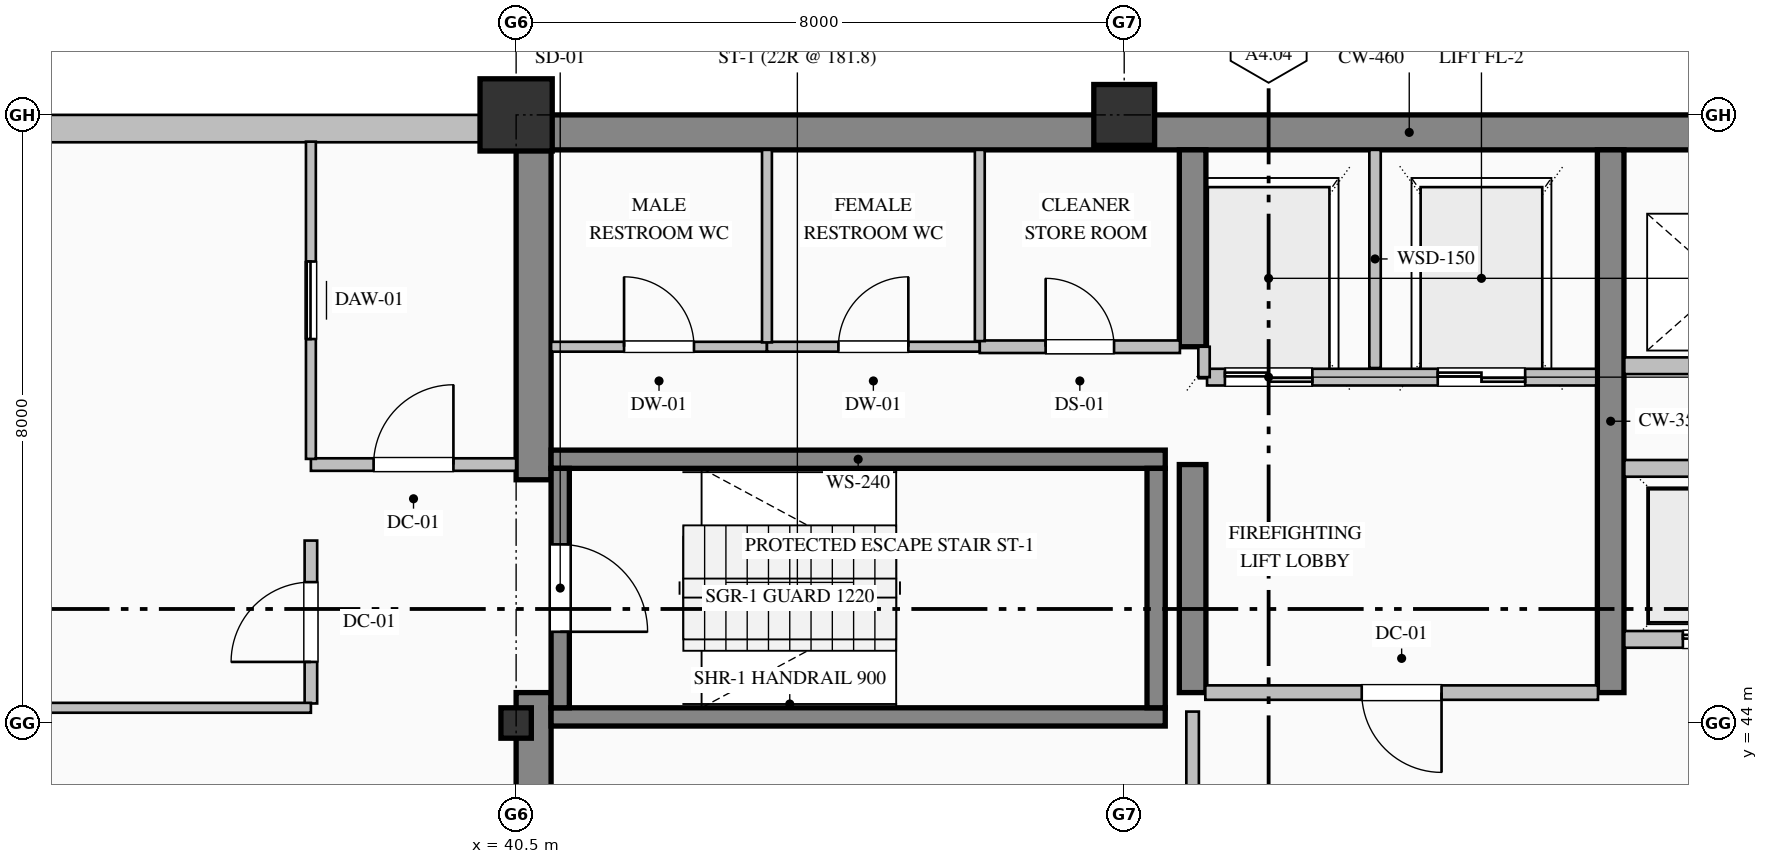
"""IFC4 building model, lengths in metres.
Left out: names, types, materials, properties, quantities, classifications, styles, units other than length and angle.
Written with IfcOpenShell. Run it as: python <this file> out.ifc"""

import sys

from ifc_helpers import new_model, si_unit, direction, frame, frame_2d, origin, origin_2d, place, context, subcontext, project, spatial, rectangle, hollow_rectangle, i_section, extrude, element, fill, save


model = new_model("IFC4")
c1 = context("Model", 3, precision=1e-05, world=origin(), true_north=direction((0.0, 1.0)))
c2 = subcontext(c1, "Body", "Model", "MODEL_VIEW")
j1 = project(units=[si_unit("LENGTHUNIT", "METRE"), si_unit("PLANEANGLEUNIT", "RADIAN")], contexts=[c1])
p1 = place(None, origin())
s1 = spatial("IfcSite", under=j1, at=p1, CompositionType="ELEMENT")
p2 = place(p1, origin())
s2 = spatial("IfcBuilding", under=s1, at=p2, CompositionType="ELEMENT")
p3 = place(p2, frame((0.0, 0.0, 253.8)))
s3 = spatial("IfcBuildingStorey", under=s2, at=p3, CompositionType="ELEMENT", Elevation=253.8)
p4 = place(p3, frame((40.5, 51.77, 0.0), z_axis=(0.0, 0.0, 1.0), x_axis=(1.0, 0.0, 0.0)))
e1 = element("IfcWall", 1, at=p4, inside=s3, PredefinedType="SHEAR", context=c2, shape_type="SweptSolid", body=[
    extrude(rectangle(XDim=23.5, YDim=0.46, at=frame_2d((11.75, 0.0))), origin(), (0.0, 0.0, 1.0), 3.775),
])
p5 = place(p3, frame((40.73, 36.46, 0.0), z_axis=(0.0, 0.0, 1.0), x_axis=(0.0, 1.0, 0.0)))
e2 = element("IfcWall", 2, at=p5, inside=s3, PredefinedType="SHEAR", context=c2, shape_type="SweptSolid", body=[
    extrude(rectangle(XDim=7.94, YDim=0.46, at=frame_2d((3.97, 0.0))), origin(), (0.0, 0.0, 1.0), 3.775),
])
p6 = place(p3, frame((40.73, 47.2, 0.0), z_axis=(0.0, 0.0, 1.0), x_axis=(0.0, 1.0, 0.0)))
e3 = element("IfcWall", 3, at=p6, inside=s3, PredefinedType="SHEAR", context=c2, shape_type="SweptSolid", body=[
    extrude(rectangle(XDim=4.34, YDim=0.46, at=frame_2d((2.17, 0.0))), origin(), (0.0, 0.0, 1.0), 3.775),
])
p7 = place(p3, frame((49.4, 44.4, 0.0), z_axis=(0.0, 0.0, 1.0), x_axis=(0.0, 1.0, 0.0)))
e4 = element("IfcWall", 4, at=p7, inside=s3, PredefinedType="SHEAR", context=c2, shape_type="SweptSolid", body=[
    extrude(rectangle(XDim=3.0, YDim=0.35, at=frame_2d((1.5, 0.0))), origin(), (0.0, 0.0, 1.0), 3.775),
])
p8 = place(p3, frame((49.4, 48.95, 0.0), z_axis=(0.0, 0.0, 1.0), x_axis=(0.0, 1.0, 0.0)))
e5 = element("IfcWall", 5, at=p8, inside=s3, PredefinedType="SHEAR", context=c2, shape_type="SweptSolid", body=[
    extrude(rectangle(XDim=2.59, YDim=0.35, at=frame_2d((1.295, 0.0))), origin(), (0.0, 0.0, 1.0), 3.775),
])
p9 = place(p3, frame((54.9, 44.4, 0.0), z_axis=(0.0, 0.0, 1.0), x_axis=(0.0, 1.0, 0.0)))
e6 = element("IfcWall", 6, at=p9, inside=s3, PredefinedType="SHEAR", context=c2, shape_type="SweptSolid", body=[
    extrude(rectangle(XDim=7.14, YDim=0.35, at=frame_2d((3.57, 0.0))), origin(), (0.0, 0.0, 1.0), 3.775),
])
p10 = place(p3, frame((40.5, 44.0, 0.0), z_axis=(0.0, 0.0, 1.0), x_axis=(1.0, 0.0, 0.0)))
e7 = element("IfcColumn", 7, at=p10, inside=s3, PredefinedType="COLUMN", context=c2, shape_type="SweptSolid", body=[
    extrude(i_section(OverallWidth=0.4, OverallDepth=0.4, WebThickness=0.013, FlangeThickness=0.021, FilletRadius=0.022, at=origin_2d()), origin(), (0.0, 0.0, 1.0), 4.0),
])
p11 = place(p3, frame((40.5, 52.0, 0.0), z_axis=(0.0, 0.0, 1.0), x_axis=(1.0, 0.0, 0.0)))
e8 = element("IfcColumn", 8, at=p11, inside=s3, PredefinedType="COLUMN", context=c2, shape_type="SweptSolid", body=[
    extrude(hollow_rectangle(XDim=0.95, YDim=0.95, WallThickness=0.036, at=origin_2d()), origin(), (0.0, 0.0, 1.0), 4.0),
])
p12 = place(p3, frame((48.5, 52.0, 0.0), z_axis=(0.0, 0.0, 1.0), x_axis=(1.0, 0.0, 0.0)))
e9 = element("IfcColumn", 9, at=p12, inside=s3, PredefinedType="COLUMN", context=c2, shape_type="SweptSolid", body=[
    extrude(hollow_rectangle(XDim=0.8, YDim=0.8, WallThickness=0.032, at=origin_2d()), origin(), (0.0, 0.0, 1.0), 4.0),
])
p13 = place(p3, frame((13.0, 51.82, 0.0), z_axis=(0.0, 0.0, 1.0), x_axis=(1.0, 0.0, 0.0)))
e10 = element("IfcWall", 10, at=p13, inside=s3, PredefinedType="SOLIDWALL", context=c2, shape_type="SweptSolid", body=[
    extrude(rectangle(XDim=27.52, YDim=0.36, at=frame_2d((13.76, 0.0))), origin(), (0.0, 0.0, 1.0), 3.325),
])
p14 = place(p13, frame((6.525, 0.0, 0.9)))
e11 = element("IfcOpeningElement", 11, at=p14, cuts=e10, PredefinedType="OPENING", context=c2, shape_type="SweptSolid", body=[
    extrude(rectangle(XDim=1.35, YDim=1.85, at=frame_2d((0.675, 0.925))), frame((0.0, 0.19, 0.0), z_axis=(0.0, -1.0, 0.0), x_axis=(1.0, 0.0, 0.0)), (0.0, 0.0, 1.0), 0.38),
])
p15 = place(p13, frame((17.325, 0.0, 0.9)))
e12 = element("IfcOpeningElement", 12, at=p15, cuts=e10, PredefinedType="OPENING", context=c2, shape_type="SweptSolid", body=[
    extrude(rectangle(XDim=1.35, YDim=1.85, at=frame_2d((0.675, 0.925))), frame((0.0, 0.19, 0.0), z_axis=(0.0, -1.0, 0.0), x_axis=(1.0, 0.0, 0.0)), (0.0, 0.0, 1.0), 0.38),
])
for number, where, z_axis, x_axis in (
    (13, (40.96, 47.47, 0.0), (0.0, 0.0, 1.0), (1.0, 0.0, 0.0)),
    (14, (49.04, 44.08, 0.0), (0.0, 0.0, 1.0), (-1.0, 0.0, 0.0)),
):
    element("IfcWall", number, at=place(p3, frame(where, z_axis=z_axis, x_axis=x_axis)), inside=s3, PredefinedType="SOLIDWALL", context=c2, shape_type="SweptSolid", body=[
        extrude(rectangle(XDim=8.08, YDim=0.24, at=frame_2d((4.04, 0.0))), origin(), (0.0, 0.0, 1.0), 4.0),
    ])
p16 = place(p3, frame((41.08, 47.35, 0.0), z_axis=(0.0, 0.0, 1.0), x_axis=(0.0, -1.0, 0.0)))
e15 = element("IfcWall", 15, at=p16, inside=s3, PredefinedType="SOLIDWALL", context=c2, shape_type="SweptSolid", body=[
    extrude(rectangle(XDim=3.15, YDim=0.24, at=frame_2d((1.575, 0.0))), origin(), (0.0, 0.0, 1.0), 4.0),
])
p17 = place(p16, frame((1.0, 0.0, 0.0)))
e16 = element("IfcOpeningElement", 16, at=p17, cuts=e15, PredefinedType="OPENING", context=c2, shape_type="SweptSolid", body=[
    extrude(rectangle(XDim=1.15, YDim=2.2, at=frame_2d((0.575, 1.1))), frame((0.0, 0.13, 0.0), z_axis=(0.0, -1.0, 0.0), x_axis=(1.0, 0.0, 0.0)), (0.0, 0.0, 1.0), 0.26),
])
p18 = place(p3, frame((48.92, 44.2, 0.0), z_axis=(0.0, 0.0, 1.0), x_axis=(0.0, 1.0, 0.0)))
e17 = element("IfcWall", 17, at=p18, inside=s3, PredefinedType="SOLIDWALL", context=c2, shape_type="SweptSolid", body=[
    extrude(rectangle(XDim=3.15, YDim=0.24, at=frame_2d((1.575, 0.0))), origin(), (0.0, 0.0, 1.0), 4.0),
])
p19 = place(p3, frame((54.71, 48.55, 0.0), z_axis=(0.0, 0.0, 1.0), x_axis=(-1.0, 0.0, 0.0)))
e18 = element("IfcWall", 18, at=p19, inside=s3, PredefinedType="PARTITIONING", context=c2, shape_type="SweptSolid", body=[
    extrude(rectangle(XDim=5.12, YDim=0.22, at=frame_2d((2.56, 0.0))), origin(), (0.0, 0.0, 1.0), 3.775),
])
p20 = place(p19, frame((3.735, 0.0, 0.0)))
e19 = element("IfcOpeningElement", 19, at=p20, cuts=e18, PredefinedType="OPENING", context=c2, shape_type="SweptSolid", body=[
    extrude(rectangle(XDim=1.15, YDim=2.2, at=frame_2d((0.575, 1.1))), frame((0.0, 0.12, 0.0), z_axis=(0.0, -1.0, 0.0), x_axis=(1.0, 0.0, 0.0)), (0.0, 0.0, 1.0), 0.24),
])
p21 = place(p19, frame((0.935, 0.0, 0.0)))
e20 = element("IfcOpeningElement", 20, at=p21, cuts=e18, PredefinedType="OPENING", context=c2, shape_type="SweptSolid", body=[
    extrude(rectangle(XDim=1.15, YDim=2.2, at=frame_2d((0.575, 1.1))), frame((0.0, 0.12, 0.0), z_axis=(0.0, -1.0, 0.0), x_axis=(1.0, 0.0, 0.0)), (0.0, 0.0, 1.0), 0.24),
])
p22 = place(p3, frame((51.8, 48.67, 0.0), z_axis=(0.0, 0.0, 1.0), x_axis=(0.0, 1.0, 0.0)))
e21 = element("IfcWall", 21, at=p22, inside=s3, PredefinedType="PARTITIONING", context=c2, shape_type="SweptSolid", body=[
    extrude(rectangle(XDim=2.87, YDim=0.15, at=frame_2d((1.435, 0.0))), origin(), (0.0, 0.0, 1.0), 3.775),
])
p23 = place(p3, frame((49.55, 48.55, 0.0), z_axis=(0.0, 0.0, 1.0), x_axis=(0.0, 1.0, 0.0)))
e22 = element("IfcWall", 22, at=p23, inside=s3, PredefinedType="PARTITIONING", context=c2, shape_type="SweptSolid", body=[
    extrude(rectangle(XDim=0.4, YDim=0.15, at=frame_2d((0.2, 0.0))), origin(), (0.0, 0.0, 1.0), 3.775),
])
p24 = place(p3, frame((63.32, 45.1, 0.0), z_axis=(0.0, 0.0, 1.0), x_axis=(-1.0, 0.0, 0.0)))
e23 = element("IfcWall", 23, at=p24, inside=s3, PredefinedType="PARTITIONING", context=c2, shape_type="SweptSolid", body=[
    extrude(rectangle(XDim=8.24, YDim=0.22, at=frame_2d((4.12, 0.0))), origin(), (0.0, 0.0, 1.0), 3.775),
])
p25 = place(p24, frame((6.37, 0.0, 0.0)))
e24 = element("IfcOpeningElement", 24, at=p25, cuts=e23, PredefinedType="OPENING", context=c2, shape_type="SweptSolid", body=[
    extrude(rectangle(XDim=1.1, YDim=2.2, at=frame_2d((0.55, 1.1))), frame((0.0, 0.12, 0.0), z_axis=(0.0, -1.0, 0.0), x_axis=(1.0, 0.0, 0.0)), (0.0, 0.0, 1.0), 0.24),
])
p26 = place(p24, frame((3.57, 0.0, 0.0)))
e25 = element("IfcOpeningElement", 25, at=p26, cuts=e23, PredefinedType="OPENING", context=c2, shape_type="SweptSolid", body=[
    extrude(rectangle(XDim=1.1, YDim=2.2, at=frame_2d((0.55, 1.1))), frame((0.0, 0.12, 0.0), z_axis=(0.0, -1.0, 0.0), x_axis=(1.0, 0.0, 0.0)), (0.0, 0.0, 1.0), 0.24),
])
p27 = place(p24, frame((0.77, 0.0, 0.0)))
e26 = element("IfcOpeningElement", 26, at=p27, cuts=e23, PredefinedType="OPENING", context=c2, shape_type="SweptSolid", body=[
    extrude(rectangle(XDim=1.1, YDim=2.2, at=frame_2d((0.55, 1.1))), frame((0.0, 0.12, 0.0), z_axis=(0.0, -1.0, 0.0), x_axis=(1.0, 0.0, 0.0)), (0.0, 0.0, 1.0), 0.24),
])
for number, where, z_axis, x_axis in (
    (27, (55.08, 47.35, 0.0), (0.0, 0.0, 1.0), (1.0, 0.0, 0.0)),
    (28, (63.32, 48.7, 0.0), (0.0, 0.0, 1.0), (-1.0, 0.0, 0.0)),
):
    element("IfcWall", number, at=place(p3, frame(where, z_axis=z_axis, x_axis=x_axis)), inside=s3, PredefinedType="PARTITIONING", context=c2, shape_type="SweptSolid", body=[
        extrude(rectangle(XDim=8.24, YDim=0.22, at=frame_2d((4.12, 0.0))), origin(), (0.0, 0.0, 1.0), 3.775),
    ])
p28 = place(p3, frame((37.8, 47.4, 0.0), z_axis=(0.0, 0.0, 1.0), x_axis=(1.0, 0.0, 0.0)))
e29 = element("IfcWall", 29, at=p28, inside=s3, PredefinedType="PARTITIONING", context=c2, shape_type="SweptSolid", body=[
    extrude(rectangle(XDim=2.7, YDim=0.165, at=frame_2d((1.35, 0.0))), origin(), (0.0, 0.0, 1.0), 3.775),
])
p29 = place(p28, frame((0.825, 0.0, 0.0)))
e30 = element("IfcOpeningElement", 30, at=p29, cuts=e29, PredefinedType="OPENING", context=c2, shape_type="SweptSolid", body=[
    extrude(rectangle(XDim=1.05, YDim=2.15, at=frame_2d((0.525, 1.075))), frame((0.0, 0.093, 0.0), z_axis=(0.0, -1.0, 0.0), x_axis=(1.0, 0.0, 0.0)), (0.0, 0.0, 1.0), 0.185),
])
p30 = place(p3, frame((37.8, 44.257, 0.0), z_axis=(0.0, 0.0, 1.0), x_axis=(0.0, 1.0, 0.0)))
e31 = element("IfcWall", 31, at=p30, inside=s3, PredefinedType="PARTITIONING", context=c2, shape_type="SweptSolid", body=[
    extrude(rectangle(XDim=2.143, YDim=0.165, at=frame_2d((1.071, 0.0))), origin(), (0.0, 0.0, 1.0), 3.775),
])
p31 = place(p30, frame((0.546, 0.0, 0.0)))
e32 = element("IfcOpeningElement", 32, at=p31, cuts=e31, PredefinedType="OPENING", context=c2, shape_type="SweptSolid", body=[
    extrude(rectangle(XDim=1.05, YDim=2.15, at=frame_2d((0.525, 1.075))), frame((0.0, 0.093, 0.0), z_axis=(0.0, -1.0, 0.0), x_axis=(1.0, 0.0, 0.0)), (0.0, 0.0, 1.0), 0.185),
])
p32 = place(p3, frame((37.8, 47.475, 0.0), z_axis=(0.0, 0.0, 1.0), x_axis=(0.0, 1.0, 0.0)))
e33 = element("IfcWall", 33, at=p32, inside=s3, PredefinedType="PARTITIONING", context=c2, shape_type="SweptSolid", body=[
    extrude(rectangle(XDim=4.173, YDim=0.13, at=frame_2d((2.087, 0.0))), origin(), (0.0, 0.0, 1.0), 3.775),
])
p33 = place(p32, frame((1.577, 0.0, 0.0)))
e34 = element("IfcOpeningElement", 34, at=p33, cuts=e33, PredefinedType="OPENING", context=c2, shape_type="SweptSolid", body=[
    extrude(rectangle(XDim=1.02, YDim=2.15, at=frame_2d((0.51, 1.075))), frame((0.0, 0.075, 0.0), z_axis=(0.0, -1.0, 0.0), x_axis=(1.0, 0.0, 0.0)), (0.0, 0.0, 1.0), 0.15),
])
p34 = place(p3, frame((40.96, 48.95, 0.0), z_axis=(0.0, 0.0, 1.0), x_axis=(1.0, 0.0, 0.0)))
e35 = element("IfcWall", 35, at=p34, inside=s3, PredefinedType="PARTITIONING", context=c2, shape_type="SweptSolid", body=[
    extrude(rectangle(XDim=2.84, YDim=0.13, at=frame_2d((1.42, 0.0))), origin(), (0.0, 0.0, 1.0), 3.775),
])
p35 = place(p34, frame((0.96, 0.0, 0.0)))
e36 = element("IfcOpeningElement", 36, at=p35, cuts=e35, PredefinedType="OPENING", context=c2, shape_type="SweptSolid", body=[
    extrude(rectangle(XDim=0.92, YDim=2.15, at=frame_2d((0.46, 1.075))), frame((0.0, 0.075, 0.0), z_axis=(0.0, -1.0, 0.0), x_axis=(1.0, 0.0, 0.0)), (0.0, 0.0, 1.0), 0.15),
])
p36 = place(p3, frame((43.8, 48.95, 0.0), z_axis=(0.0, 0.0, 1.0), x_axis=(1.0, 0.0, 0.0)))
e37 = element("IfcWall", 37, at=p36, inside=s3, PredefinedType="PARTITIONING", context=c2, shape_type="SweptSolid", body=[
    extrude(rectangle(XDim=2.8, YDim=0.13, at=frame_2d((1.4, 0.0))), origin(), (0.0, 0.0, 1.0), 3.775),
])
p37 = place(p36, frame((0.94, 0.0, 0.0)))
e38 = element("IfcOpeningElement", 38, at=p37, cuts=e37, PredefinedType="OPENING", context=c2, shape_type="SweptSolid", body=[
    extrude(rectangle(XDim=0.92, YDim=2.15, at=frame_2d((0.46, 1.075))), frame((0.0, 0.075, 0.0), z_axis=(0.0, -1.0, 0.0), x_axis=(1.0, 0.0, 0.0)), (0.0, 0.0, 1.0), 0.15),
])
p38 = place(p3, frame((46.6, 48.95, 0.0), z_axis=(0.0, 0.0, 1.0), x_axis=(1.0, 0.0, 0.0)))
e39 = element("IfcWall", 39, at=p38, inside=s3, PredefinedType="PARTITIONING", context=c2, shape_type="SweptSolid", body=[
    extrude(rectangle(XDim=2.633, YDim=0.165, at=frame_2d((1.316, 0.0))), origin(), (0.0, 0.0, 1.0), 3.775),
])
p39 = place(p38, frame((0.866, 0.0, 0.0)))
e40 = element("IfcOpeningElement", 40, at=p39, cuts=e39, PredefinedType="OPENING", context=c2, shape_type="SweptSolid", body=[
    extrude(rectangle(XDim=0.9, YDim=2.15, at=frame_2d((0.45, 1.075))), frame((0.0, 0.093, 0.0), z_axis=(0.0, -1.0, 0.0), x_axis=(1.0, 0.0, 0.0)), (0.0, 0.0, 1.0), 0.185),
])
p40 = place(p3, frame((54.733, 44.4, 0.0), z_axis=(0.0, 0.0, 1.0), x_axis=(-1.0, 0.0, 0.0)))
e41 = element("IfcWall", 41, at=p40, inside=s3, PredefinedType="PARTITIONING", context=c2, shape_type="SweptSolid", body=[
    extrude(rectangle(XDim=5.166, YDim=0.19, at=frame_2d((2.583, 0.0))), origin(), (0.0, 0.0, 1.0), 3.775),
])
p41 = place(p40, frame((2.058, 0.0, 0.0)))
e42 = element("IfcOpeningElement", 42, at=p41, cuts=e41, PredefinedType="OPENING", context=c2, shape_type="SweptSolid", body=[
    extrude(rectangle(XDim=1.05, YDim=2.15, at=frame_2d((0.525, 1.075))), frame((0.0, 0.105, 0.0), z_axis=(0.0, -1.0, 0.0), x_axis=(1.0, 0.0, 0.0)), (0.0, 0.0, 1.0), 0.21),
])
p42 = place(p3, frame((49.4, 36.46, 0.0), z_axis=(0.0, 0.0, 1.0), x_axis=(0.0, 1.0, 0.0)))
e43 = element("IfcWall", 43, at=p42, inside=s3, PredefinedType="PARTITIONING", context=c2, shape_type="SweptSolid", body=[
    extrude(rectangle(XDim=7.69, YDim=0.165, at=frame_2d((3.845, 0.0))), origin(), (0.0, 0.0, 1.0), 3.017),
])
p43 = place(p42, frame((3.345, 0.0, 0.0)))
e44 = element("IfcOpeningElement", 44, at=p43, cuts=e43, PredefinedType="OPENING", context=c2, shape_type="SweptSolid", body=[
    extrude(rectangle(XDim=1.0, YDim=2.15, at=frame_2d((0.5, 1.075))), frame((0.0, 0.093, 0.0), z_axis=(0.0, -1.0, 0.0), x_axis=(1.0, 0.0, 0.0)), (0.0, 0.0, 1.0), 0.185),
])
p44 = place(p3, frame((43.8, 51.54, 0.0), z_axis=(0.0, 0.0, 1.0), x_axis=(0.0, -1.0, 0.0)))
e45 = element("IfcWall", 45, at=p44, inside=s3, PredefinedType="PARTITIONING", context=c2, shape_type="SweptSolid", body=[
    extrude(rectangle(XDim=2.533, YDim=0.13, at=frame_2d((1.267, 0.0))), origin(), (0.0, 0.0, 1.0), 3.775),
])
p45 = place(p3, frame((46.6, 51.54, 0.0), z_axis=(0.0, 0.0, 1.0), x_axis=(0.0, -1.0, 0.0)))
e46 = element("IfcWall", 46, at=p45, inside=s3, PredefinedType="PARTITIONING", context=c2, shape_type="SweptSolid", body=[
    extrude(rectangle(XDim=2.516, YDim=0.13, at=frame_2d((1.258, 0.0))), origin(), (0.0, 0.0, 1.0), 3.775),
])
p46 = place(p3, frame((37.8, 44.2, 0.0), z_axis=(0.0, 0.0, 1.0), x_axis=(-1.0, 0.0, 0.0)))
e47 = element("IfcWall", 47, at=p46, inside=s3, PredefinedType="PARTITIONING", context=c2, shape_type="SweptSolid", body=[
    extrude(rectangle(XDim=8.2, YDim=0.13, at=frame_2d((4.1, 0.0))), origin(), (0.0, 0.0, 1.0), 3.775),
])
p47 = place(p46, frame((3.6, 0.0, 0.0)))
e48 = element("IfcOpeningElement", 48, at=p47, cuts=e47, PredefinedType="OPENING", context=c2, shape_type="SweptSolid", body=[
    extrude(rectangle(XDim=1.0, YDim=2.15, at=frame_2d((0.5, 1.075))), frame((0.0, 0.075, 0.0), z_axis=(0.0, -1.0, 0.0), x_axis=(1.0, 0.0, 0.0)), (0.0, 0.0, 1.0), 0.15),
])
p48 = place(p17, origin())
e49 = element("IfcDoor", 49, at=p48, inside=s3, OperationType="SINGLE_SWING_RIGHT", PredefinedType="DOOR", context=c2, shape_type="SweptSolid", body=[
    extrude(rectangle(XDim=1.15, YDim=2.2, at=frame_2d((0.575, 1.1))), frame((0.0, 0.025, 0.0), z_axis=(0.0, -1.0, 0.0), x_axis=(1.0, 0.0, 0.0)), (0.0, 0.0, 1.0), 0.05),
])
fill(e16, e49)
p49 = place(p20, origin())
e50 = element("IfcDoor", 50, at=p49, inside=s3, OperationType="DOUBLE_DOOR_SLIDING", PredefinedType="DOOR", context=c2, shape_type="SweptSolid", body=[
    extrude(rectangle(XDim=1.15, YDim=2.2, at=frame_2d((0.575, 1.1))), frame((0.0, 0.025, 0.0), z_axis=(0.0, -1.0, 0.0), x_axis=(1.0, 0.0, 0.0)), (0.0, 0.0, 1.0), 0.05),
])
fill(e19, e50)
p50 = place(p21, origin())
e51 = element("IfcDoor", 51, at=p50, inside=s3, OperationType="DOUBLE_DOOR_SLIDING", PredefinedType="DOOR", context=c2, shape_type="SweptSolid", body=[
    extrude(rectangle(XDim=1.15, YDim=2.2, at=frame_2d((0.575, 1.1))), frame((0.0, 0.025, 0.0), z_axis=(0.0, -1.0, 0.0), x_axis=(1.0, 0.0, 0.0)), (0.0, 0.0, 1.0), 0.05),
])
fill(e20, e51)
p51 = place(p25, origin())
e52 = element("IfcDoor", 52, at=p51, inside=s3, OperationType="DOUBLE_DOOR_SLIDING", PredefinedType="DOOR", context=c2, shape_type="SweptSolid", body=[
    extrude(rectangle(XDim=1.1, YDim=2.2, at=frame_2d((0.55, 1.1))), frame((0.0, 0.025, 0.0), z_axis=(0.0, -1.0, 0.0), x_axis=(1.0, 0.0, 0.0)), (0.0, 0.0, 1.0), 0.05),
])
fill(e24, e52)
p52 = place(p41, origin())
e53 = element("IfcDoor", 53, at=p52, inside=s3, OperationType="SINGLE_SWING_LEFT", PredefinedType="DOOR", context=c2, shape_type="SweptSolid", body=[
    extrude(rectangle(XDim=1.05, YDim=2.15, at=frame_2d((0.525, 1.075))), frame((0.0, 0.025, 0.0), z_axis=(0.0, -1.0, 0.0), x_axis=(1.0, 0.0, 0.0)), (0.0, 0.0, 1.0), 0.05),
])
fill(e42, e53)
p53 = place(p29, origin())
e54 = element("IfcDoor", 54, at=p53, inside=s3, OperationType="SINGLE_SWING_RIGHT", PredefinedType="DOOR", context=c2, shape_type="SweptSolid", body=[
    extrude(rectangle(XDim=1.05, YDim=2.15, at=frame_2d((0.525, 1.075))), frame((0.0, 0.025, 0.0), z_axis=(0.0, -1.0, 0.0), x_axis=(1.0, 0.0, 0.0)), (0.0, 0.0, 1.0), 0.05),
])
fill(e30, e54)
p54 = place(p31, origin())
e55 = element("IfcDoor", 55, at=p54, inside=s3, OperationType="SINGLE_SWING_LEFT", PredefinedType="DOOR", context=c2, shape_type="SweptSolid", body=[
    extrude(rectangle(XDim=1.05, YDim=2.15, at=frame_2d((0.525, 1.075))), frame((0.0, 0.025, 0.0), z_axis=(0.0, -1.0, 0.0), x_axis=(1.0, 0.0, 0.0)), (0.0, 0.0, 1.0), 0.05),
])
fill(e32, e55)
p55 = place(p33, origin())
e56 = element("IfcDoor", 56, at=p55, inside=s3, OperationType="SLIDING_TO_LEFT", PredefinedType="DOOR", context=c2, shape_type="SweptSolid", body=[
    extrude(rectangle(XDim=1.02, YDim=2.15, at=frame_2d((0.51, 1.075))), frame((0.0, 0.025, 0.0), z_axis=(0.0, -1.0, 0.0), x_axis=(1.0, 0.0, 0.0)), (0.0, 0.0, 1.0), 0.05),
])
fill(e34, e56)
p56 = place(p35, origin())
e57 = element("IfcDoor", 57, at=p56, inside=s3, OperationType="SINGLE_SWING_LEFT", PredefinedType="DOOR", context=c2, shape_type="SweptSolid", body=[
    extrude(rectangle(XDim=0.92, YDim=2.15, at=frame_2d((0.46, 1.075))), frame((0.0, 0.025, 0.0), z_axis=(0.0, -1.0, 0.0), x_axis=(1.0, 0.0, 0.0)), (0.0, 0.0, 1.0), 0.05),
])
fill(e36, e57)
p57 = place(p37, origin())
e58 = element("IfcDoor", 58, at=p57, inside=s3, OperationType="SINGLE_SWING_RIGHT", PredefinedType="DOOR", context=c2, shape_type="SweptSolid", body=[
    extrude(rectangle(XDim=0.92, YDim=2.15, at=frame_2d((0.46, 1.075))), frame((0.0, 0.025, 0.0), z_axis=(0.0, -1.0, 0.0), x_axis=(1.0, 0.0, 0.0)), (0.0, 0.0, 1.0), 0.05),
])
fill(e38, e58)
p58 = place(p39, origin())
e59 = element("IfcDoor", 59, at=p58, inside=s3, OperationType="SINGLE_SWING_LEFT", PredefinedType="DOOR", context=c2, shape_type="SweptSolid", body=[
    extrude(rectangle(XDim=0.9, YDim=2.15, at=frame_2d((0.45, 1.075))), frame((0.0, 0.025, 0.0), z_axis=(0.0, -1.0, 0.0), x_axis=(1.0, 0.0, 0.0)), (0.0, 0.0, 1.0), 0.05),
])
fill(e40, e59)
save(model, sys.argv[1])
